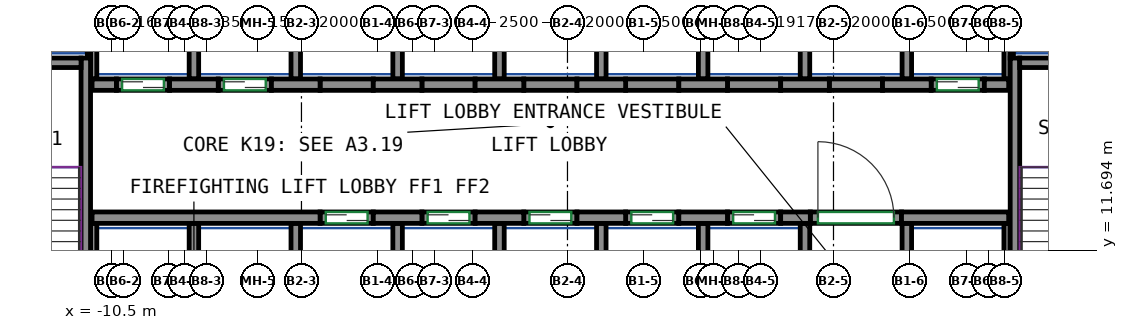
"""IFC4 building model, lengths in metres.
Left out: names, types, materials, properties, quantities, classifications, styles, units other than length and angle.
Written with IfcOpenShell. Run it as: python <this file> out.ifc"""

import sys

from ifc_helpers import new_model, si_unit, direction, frame, frame_2d, origin, place, context, subcontext, project, spatial, rectangle, extrude, source, transform, mapped, element, fill, save


model = new_model("IFC4")
c1 = context("Model", 3, precision=1e-05, world=origin(), true_north=direction((0.0, 1.0)))
c2 = subcontext(c1, "Body", "Model", "MODEL_VIEW")
j1 = project(units=[si_unit("LENGTHUNIT", "METRE"), si_unit("PLANEANGLEUNIT", "RADIAN")], contexts=[c1])
p1 = place(None, origin())
s1 = spatial("IfcSite", under=j1, at=p1, CompositionType="ELEMENT")
p2 = place(p1, origin())
s2 = spatial("IfcBuilding", under=s1, at=p2, CompositionType="ELEMENT")
p3 = place(p2, frame((0.0, 0.0, 79.2)))
s3 = spatial("IfcBuildingStorey", under=s2, at=p3, CompositionType="ELEMENT", Elevation=79.2)
m1 = source(origin(), c2, "Body", "SweptSolid", [
    extrude(rectangle(XDim=7.75, YDim=0.25, at=frame_2d((3.875, 0.0))), origin(), (0.0, 0.0, 1.0), 3.72),
])
p4 = place(p3, frame((-11.175, 9.0, 0.0), z_axis=(0.0, 0.0, 1.0), x_axis=(0.0, 1.0, 0.0)))
e1 = element("IfcWall", 1, at=p4, inside=s3, PredefinedType="SHEAR", context=c2, shape_type="MappedRepresentation", body=[
    mapped(m1, transform((0.0, 0.0, 0.0))),
])
m2 = source(origin(), c2, "Body", "SweptSolid", [
    extrude(rectangle(XDim=3.7, YDim=0.25, at=frame_2d((1.85, 0.0))), origin(), (0.0, 0.0, 1.0), 3.72),
])
p5 = place(p3, frame((-15.0, 16.625, 0.0), z_axis=(0.0, 0.0, 1.0), x_axis=(1.0, 0.0, 0.0)))
e2 = element("IfcWall", 2, at=p5, inside=s3, PredefinedType="SHEAR", context=c2, shape_type="MappedRepresentation", body=[
    mapped(m2, transform((0.0, 0.0, 0.0))),
])
p6 = place(p3, frame((13.275, 9.0, 0.0), z_axis=(0.0, 0.0, 1.0), x_axis=(0.0, 1.0, 0.0)))
e3 = element("IfcWall", 3, at=p6, inside=s3, PredefinedType="SHEAR", context=c2, shape_type="MappedRepresentation", body=[
    mapped(m1, transform((0.0, 0.0, 0.0))),
])
m3 = source(origin(), c2, "Body", "SweptSolid", [
    extrude(rectangle(XDim=3.7, YDim=0.25, at=frame_2d((1.85, 0.0))), origin(), (0.0, 0.0, 1.0), 3.72),
])
p7 = place(p3, frame((13.4, 16.625, 0.0), z_axis=(0.0, 0.0, 1.0), x_axis=(1.0, 0.0, 0.0)))
e4 = element("IfcWall", 4, at=p7, inside=s3, PredefinedType="SHEAR", context=c2, shape_type="MappedRepresentation", body=[
    mapped(m3, transform((0.0, 0.0, 0.0))),
])
m4 = source(origin(), c2, "Body", "SweptSolid", [
    extrude(rectangle(XDim=6.0, YDim=0.3, at=frame_2d((3.0, 0.0))), origin(), (0.0, 0.0, 1.0), 3.72),
])
p8 = place(p3, frame((-11.01, 12.55, 0.0), z_axis=(0.0, 0.0, 1.0), x_axis=(1.0, 0.0, 0.0)))
e5 = element("IfcWall", 5, at=p8, inside=s3, PredefinedType="SHEAR", context=c2, shape_type="MappedRepresentation", body=[
    mapped(m4, transform((0.0, 0.0, 0.0))),
])
m5 = source(origin(), c2, "Body", "SweptSolid", [
    extrude(rectangle(XDim=1.28, YDim=0.3, at=frame_2d((0.64, 0.0))), origin(), (0.0, 0.0, 1.0), 3.72),
])
for number, where, z_axis, x_axis in (
    (6, (-3.61, 12.55, 0.0), (0.0, 0.0, 1.0), (1.0, 0.0, 0.0)),
    (7, (-0.93, 12.55, 0.0), (0.0, 0.0, 1.0), (1.0, 0.0, 0.0)),
    (8, (1.75, 12.55, 0.0), (0.0, 0.0, 1.0), (1.0, 0.0, 0.0)),
    (9, (4.43, 12.55, 0.0), (0.0, 0.0, 1.0), (1.0, 0.0, 0.0)),
):
    element("IfcWall", number, at=place(p3, frame(where, z_axis=z_axis, x_axis=x_axis)), inside=s3, PredefinedType="SHEAR", context=c2, shape_type="MappedRepresentation", body=[
        mapped(m5, transform((0.0, 0.0, 0.0))),
    ])
m6 = source(origin(), c2, "Body", "SweptSolid", [
    extrude(rectangle(XDim=0.78, YDim=0.3, at=frame_2d((0.39, 0.0))), origin(), (0.0, 0.0, 1.0), 3.72),
])
p9 = place(p3, frame((7.11, 12.55, 0.0), z_axis=(0.0, 0.0, 1.0), x_axis=(1.0, 0.0, 0.0)))
e10 = element("IfcWall", 10, at=p9, inside=s3, PredefinedType="SHEAR", context=c2, shape_type="MappedRepresentation", body=[
    mapped(m6, transform((0.0, 0.0, 0.0))),
])
m7 = source(origin(), c2, "Body", "SweptSolid", [
    extrude(rectangle(XDim=2.82, YDim=0.3, at=frame_2d((1.41, 0.0))), origin(), (0.0, 0.0, 1.0), 3.72),
])
p10 = place(p3, frame((10.29, 12.55, 0.0), z_axis=(0.0, 0.0, 1.0), x_axis=(1.0, 0.0, 0.0)))
e11 = element("IfcWall", 11, at=p10, inside=s3, PredefinedType="SHEAR", context=c2, shape_type="MappedRepresentation", body=[
    mapped(m7, transform((0.0, 0.0, 0.0))),
])
m8 = source(origin(), c2, "Body", "SweptSolid", [
    extrude(rectangle(XDim=0.64, YDim=0.3, at=frame_2d((0.32, 0.0))), origin(), (0.0, 0.0, 1.0), 3.72),
])
p11 = place(p3, frame((-11.01, 16.05, 0.0), z_axis=(0.0, 0.0, 1.0), x_axis=(1.0, 0.0, 0.0)))
e12 = element("IfcWall", 12, at=p11, inside=s3, PredefinedType="SHEAR", context=c2, shape_type="MappedRepresentation", body=[
    mapped(m8, transform((0.0, 0.0, 0.0))),
])
for number, where, z_axis, x_axis in (
    (13, (-8.97, 16.05, 0.0), (0.0, 0.0, 1.0), (1.0, 0.0, 0.0)),
    (14, (-6.29, 16.05, 0.0), (0.0, 0.0, 1.0), (1.0, 0.0, 0.0)),
    (15, (-3.61, 16.05, 0.0), (0.0, 0.0, 1.0), (1.0, 0.0, 0.0)),
    (16, (-0.93, 16.05, 0.0), (0.0, 0.0, 1.0), (1.0, 0.0, 0.0)),
    (17, (1.75, 16.05, 0.0), (0.0, 0.0, 1.0), (1.0, 0.0, 0.0)),
    (18, (4.43, 16.05, 0.0), (0.0, 0.0, 1.0), (1.0, 0.0, 0.0)),
):
    element("IfcWall", number, at=place(p3, frame(where, z_axis=z_axis, x_axis=x_axis)), inside=s3, PredefinedType="SHEAR", context=c2, shape_type="MappedRepresentation", body=[
        mapped(m5, transform((0.0, 0.0, 0.0))),
    ])
m9 = source(origin(), c2, "Body", "SweptSolid", [
    extrude(rectangle(XDim=1.28, YDim=0.3, at=frame_2d((0.64, 0.0))), origin(), (0.0, 0.0, 1.0), 3.72),
])
p12 = place(p3, frame((7.11, 16.05, 0.0), z_axis=(0.0, 0.0, 1.0), x_axis=(1.0, 0.0, 0.0)))
e19 = element("IfcWall", 19, at=p12, inside=s3, PredefinedType="SHEAR", context=c2, shape_type="MappedRepresentation", body=[
    mapped(m9, transform((0.0, 0.0, 0.0))),
])
p13 = place(p3, frame((9.79, 16.05, 0.0), z_axis=(0.0, 0.0, 1.0), x_axis=(1.0, 0.0, 0.0)))
e20 = element("IfcWall", 20, at=p13, inside=s3, PredefinedType="SHEAR", context=c2, shape_type="MappedRepresentation", body=[
    mapped(m5, transform((0.0, 0.0, 0.0))),
])
m10 = source(origin(), c2, "Body", "SweptSolid", [
    extrude(rectangle(XDim=0.64, YDim=0.3, at=frame_2d((0.32, 0.0))), origin(), (0.0, 0.0, 1.0), 3.72),
])
p14 = place(p3, frame((12.47, 16.05, 0.0), z_axis=(0.0, 0.0, 1.0), x_axis=(1.0, 0.0, 0.0)))
e21 = element("IfcWall", 21, at=p14, inside=s3, PredefinedType="SHEAR", context=c2, shape_type="MappedRepresentation", body=[
    mapped(m10, transform((0.0, 0.0, 0.0))),
])
m11 = source(origin(), c2, "Body", "SweptSolid", [
    extrude(rectangle(XDim=1.4, YDim=0.3, at=frame_2d((0.7, 0.0))), origin(), (0.0, 0.0, 1.0), 3.72),
])
p15 = place(p3, frame((-5.01, 12.55, 0.0), z_axis=(0.0, 0.0, 1.0), x_axis=(1.0, 0.0, 0.0)))
e22 = element("IfcWall", 22, at=p15, inside=s3, PredefinedType="PARTITIONING", context=c2, shape_type="MappedRepresentation", body=[
    mapped(m11, transform((0.0, 0.0, 0.0))),
])
p16 = place(p15, frame((0.15, 0.0, 0.0)))
e23 = element("IfcOpeningElement", 23, at=p16, cuts=e22, PredefinedType="OPENING", context=c2, shape_type="SweptSolid", body=[
    extrude(rectangle(XDim=1.1, YDim=2.1, at=frame_2d((0.55, 1.05))), frame((0.0, 0.16, 0.0), z_axis=(0.0, -1.0, 0.0), x_axis=(1.0, 0.0, 0.0)), (0.0, 0.0, 1.0), 0.32),
])
m12 = source(origin(), c2, "Body", "SweptSolid", [
    extrude(rectangle(XDim=1.4, YDim=0.3, at=frame_2d((0.7, 0.0))), origin(), (0.0, 0.0, 1.0), 3.72),
])
p17 = place(p3, frame((-2.33, 12.55, 0.0), z_axis=(0.0, 0.0, 1.0), x_axis=(1.0, 0.0, 0.0)))
e24 = element("IfcWall", 24, at=p17, inside=s3, PredefinedType="PARTITIONING", context=c2, shape_type="MappedRepresentation", body=[
    mapped(m12, transform((0.0, 0.0, 0.0))),
])
p18 = place(p17, frame((0.15, 0.0, 0.0)))
e25 = element("IfcOpeningElement", 25, at=p18, cuts=e24, PredefinedType="OPENING", context=c2, shape_type="SweptSolid", body=[
    extrude(rectangle(XDim=1.1, YDim=2.1, at=frame_2d((0.55, 1.05))), frame((0.0, 0.16, 0.0), z_axis=(0.0, -1.0, 0.0), x_axis=(1.0, 0.0, 0.0)), (0.0, 0.0, 1.0), 0.32),
])
p19 = place(p3, frame((0.35, 12.55, 0.0), z_axis=(0.0, 0.0, 1.0), x_axis=(1.0, 0.0, 0.0)))
e26 = element("IfcWall", 26, at=p19, inside=s3, PredefinedType="PARTITIONING", context=c2, shape_type="MappedRepresentation", body=[
    mapped(m11, transform((0.0, 0.0, 0.0))),
])
p20 = place(p19, frame((0.15, 0.0, 0.0)))
e27 = element("IfcOpeningElement", 27, at=p20, cuts=e26, PredefinedType="OPENING", context=c2, shape_type="SweptSolid", body=[
    extrude(rectangle(XDim=1.1, YDim=2.1, at=frame_2d((0.55, 1.05))), frame((0.0, 0.16, 0.0), z_axis=(0.0, -1.0, 0.0), x_axis=(1.0, 0.0, 0.0)), (0.0, 0.0, 1.0), 0.32),
])
p21 = place(p3, frame((3.03, 12.55, 0.0), z_axis=(0.0, 0.0, 1.0), x_axis=(1.0, 0.0, 0.0)))
e28 = element("IfcWall", 28, at=p21, inside=s3, PredefinedType="PARTITIONING", context=c2, shape_type="MappedRepresentation", body=[
    mapped(m11, transform((0.0, 0.0, 0.0))),
])
p22 = place(p21, frame((0.15, 0.0, 0.0)))
e29 = element("IfcOpeningElement", 29, at=p22, cuts=e28, PredefinedType="OPENING", context=c2, shape_type="SweptSolid", body=[
    extrude(rectangle(XDim=1.1, YDim=2.1, at=frame_2d((0.55, 1.05))), frame((0.0, 0.16, 0.0), z_axis=(0.0, -1.0, 0.0), x_axis=(1.0, 0.0, 0.0)), (0.0, 0.0, 1.0), 0.32),
])
p23 = place(p3, frame((5.71, 12.55, 0.0), z_axis=(0.0, 0.0, 1.0), x_axis=(1.0, 0.0, 0.0)))
e30 = element("IfcWall", 30, at=p23, inside=s3, PredefinedType="PARTITIONING", context=c2, shape_type="MappedRepresentation", body=[
    mapped(m12, transform((0.0, 0.0, 0.0))),
])
p24 = place(p23, frame((0.15, 0.0, 0.0)))
e31 = element("IfcOpeningElement", 31, at=p24, cuts=e30, PredefinedType="OPENING", context=c2, shape_type="SweptSolid", body=[
    extrude(rectangle(XDim=1.1, YDim=2.1, at=frame_2d((0.55, 1.05))), frame((0.0, 0.16, 0.0), z_axis=(0.0, -1.0, 0.0), x_axis=(1.0, 0.0, 0.0)), (0.0, 0.0, 1.0), 0.32),
])
p25 = place(p3, frame((11.07, 16.05, 0.0), z_axis=(0.0, 0.0, 1.0), x_axis=(1.0, 0.0, 0.0)))
e32 = element("IfcWall", 32, at=p25, inside=s3, PredefinedType="PARTITIONING", context=c2, shape_type="MappedRepresentation", body=[
    mapped(m11, transform((0.0, 0.0, 0.0))),
])
p26 = place(p25, frame((0.15, 0.0, 0.0)))
e33 = element("IfcOpeningElement", 33, at=p26, cuts=e32, PredefinedType="OPENING", context=c2, shape_type="SweptSolid", body=[
    extrude(rectangle(XDim=1.1, YDim=2.1, at=frame_2d((0.55, 1.05))), frame((0.0, 0.16, 0.0), z_axis=(0.0, -1.0, 0.0), x_axis=(1.0, 0.0, 0.0)), (0.0, 0.0, 1.0), 0.32),
])
p27 = place(p3, frame((-10.37, 16.05, 0.0), z_axis=(0.0, 0.0, 1.0), x_axis=(1.0, 0.0, 0.0)))
e34 = element("IfcWall", 34, at=p27, inside=s3, PredefinedType="PARTITIONING", context=c2, shape_type="MappedRepresentation", body=[
    mapped(m12, transform((0.0, 0.0, 0.0))),
])
p28 = place(p27, frame((0.15, 0.0, 0.0)))
e35 = element("IfcOpeningElement", 35, at=p28, cuts=e34, PredefinedType="OPENING", context=c2, shape_type="SweptSolid", body=[
    extrude(rectangle(XDim=1.1, YDim=2.1, at=frame_2d((0.55, 1.05))), frame((0.0, 0.16, 0.0), z_axis=(0.0, -1.0, 0.0), x_axis=(1.0, 0.0, 0.0)), (0.0, 0.0, 1.0), 0.32),
])
p29 = place(p3, frame((-7.69, 16.05, 0.0), z_axis=(0.0, 0.0, 1.0), x_axis=(1.0, 0.0, 0.0)))
e36 = element("IfcWall", 36, at=p29, inside=s3, PredefinedType="PARTITIONING", context=c2, shape_type="MappedRepresentation", body=[
    mapped(m11, transform((0.0, 0.0, 0.0))),
])
p30 = place(p29, frame((0.15, 0.0, 0.0)))
e37 = element("IfcOpeningElement", 37, at=p30, cuts=e36, PredefinedType="OPENING", context=c2, shape_type="SweptSolid", body=[
    extrude(rectangle(XDim=1.1, YDim=2.1, at=frame_2d((0.55, 1.05))), frame((0.0, 0.16, 0.0), z_axis=(0.0, -1.0, 0.0), x_axis=(1.0, 0.0, 0.0)), (0.0, 0.0, 1.0), 0.32),
])
m13 = source(origin(), c2, "Body", "SweptSolid", [
    extrude(rectangle(XDim=2.4, YDim=0.3, at=frame_2d((1.2, 0.0))), origin(), (0.0, 0.0, 1.0), 3.72),
])
p31 = place(p3, frame((7.89, 12.55, 0.0), z_axis=(0.0, 0.0, 1.0), x_axis=(1.0, 0.0, 0.0)))
e38 = element("IfcWall", 38, at=p31, inside=s3, PredefinedType="PARTITIONING", context=c2, shape_type="MappedRepresentation", body=[
    mapped(m13, transform((0.0, 0.0, 0.0))),
])
p32 = place(p31, frame((0.2, 0.0, 0.0)))
e39 = element("IfcOpeningElement", 39, at=p32, cuts=e38, PredefinedType="OPENING", context=c2, shape_type="SweptSolid", body=[
    extrude(rectangle(XDim=2.0, YDim=2.1, at=frame_2d((1.0, 1.05))), frame((0.0, 0.16, 0.0), z_axis=(0.0, -1.0, 0.0), x_axis=(1.0, 0.0, 0.0)), (0.0, 0.0, 1.0), 0.32),
])
p33 = place(p3, frame((-5.01, 16.05, 0.0), z_axis=(0.0, 0.0, 1.0), x_axis=(1.0, 0.0, 0.0)))
e40 = element("IfcWall", 40, at=p33, inside=s3, PredefinedType="PARTITIONING", context=c2, shape_type="MappedRepresentation", body=[
    mapped(m11, transform((0.0, 0.0, 0.0))),
])
p34 = place(p3, frame((-2.33, 16.05, 0.0), z_axis=(0.0, 0.0, 1.0), x_axis=(1.0, 0.0, 0.0)))
e41 = element("IfcWall", 41, at=p34, inside=s3, PredefinedType="PARTITIONING", context=c2, shape_type="MappedRepresentation", body=[
    mapped(m12, transform((0.0, 0.0, 0.0))),
])
for number, where, z_axis, x_axis in (
    (42, (0.35, 16.05, 0.0), (0.0, 0.0, 1.0), (1.0, 0.0, 0.0)),
    (43, (3.03, 16.05, 0.0), (0.0, 0.0, 1.0), (1.0, 0.0, 0.0)),
):
    element("IfcWall", number, at=place(p3, frame(where, z_axis=z_axis, x_axis=x_axis)), inside=s3, PredefinedType="PARTITIONING", context=c2, shape_type="MappedRepresentation", body=[
        mapped(m11, transform((0.0, 0.0, 0.0))),
    ])
for number, where, z_axis, x_axis in (
    (44, (5.71, 16.05, 0.0), (0.0, 0.0, 1.0), (1.0, 0.0, 0.0)),
    (45, (8.39, 16.05, 0.0), (0.0, 0.0, 1.0), (1.0, 0.0, 0.0)),
):
    element("IfcWall", number, at=place(p3, frame(where, z_axis=z_axis, x_axis=x_axis)), inside=s3, PredefinedType="PARTITIONING", context=c2, shape_type="MappedRepresentation", body=[
        mapped(m12, transform((0.0, 0.0, 0.0))),
    ])
m14 = source(origin(), c2, "Body", "SweptSolid", [
    extrude(rectangle(XDim=3.275, YDim=0.165, at=frame_2d((1.638, 0.0))), origin(), (0.0, 0.0, 1.0), 3.72),
])
for number, where, z_axis, x_axis in (
    (46, (13.067, 16.2, 0.0), (0.0, 0.0, 1.0), (0.0, 1.0, 0.0)),
    (47, (-10.968, 16.2, 0.0), (0.0, 0.0, 1.0), (0.0, 1.0, 0.0)),
):
    element("IfcWall", number, at=place(p3, frame(where, z_axis=z_axis, x_axis=x_axis)), inside=s3, PredefinedType="PARTITIONING", context=c2, shape_type="MappedRepresentation", body=[
        mapped(m14, transform((0.0, 0.0, 0.0))),
    ])
m15 = source(origin(), c2, "Body", "SweptSolid", [
    extrude(rectangle(XDim=3.275, YDim=0.25, at=frame_2d((1.638, 0.0))), origin(), (0.0, 0.0, 1.0), 3.72),
])
p35 = place(p3, frame((10.43, 16.2, 0.0), z_axis=(0.0, 0.0, 1.0), x_axis=(0.0, 1.0, 0.0)))
e48 = element("IfcWall", 48, at=p35, inside=s3, PredefinedType="PARTITIONING", context=c2, shape_type="MappedRepresentation", body=[
    mapped(m15, transform((0.0, 0.0, 0.0))),
])
m16 = source(origin(), c2, "Body", "SweptSolid", [
    extrude(rectangle(XDim=2.725, YDim=0.085, at=frame_2d((1.363, 0.0))), origin(), (0.0, 0.0, 1.0), 3.72),
])
p36 = place(p3, frame((13.192, 16.75, 0.0), z_axis=(0.0, 0.0, 1.0), x_axis=(0.0, 1.0, 0.0)))
e49 = element("IfcWall", 49, at=p36, inside=s3, PredefinedType="PARTITIONING", context=c2, shape_type="MappedRepresentation", body=[
    mapped(m16, transform((0.0, 0.0, 0.0))),
])
for number, where, z_axis, x_axis in (
    (50, (2.39, 16.2, 0.0), (0.0, 0.0, 1.0), (0.0, 1.0, 0.0)),
    (51, (5.07, 16.2, 0.0), (0.0, 0.0, 1.0), (0.0, 1.0, 0.0)),
    (52, (7.75, 16.2, 0.0), (0.0, 0.0, 1.0), (0.0, 1.0, 0.0)),
    (53, (-0.29, 16.2, 0.0), (0.0, 0.0, 1.0), (0.0, 1.0, 0.0)),
):
    element("IfcWall", number, at=place(p3, frame(where, z_axis=z_axis, x_axis=x_axis)), inside=s3, PredefinedType="PARTITIONING", context=c2, shape_type="MappedRepresentation", body=[
        mapped(m15, transform((0.0, 0.0, 0.0))),
    ])
p37 = place(p3, frame((-11.093, 16.75, 0.0), z_axis=(0.0, 0.0, 1.0), x_axis=(0.0, 1.0, 0.0)))
e54 = element("IfcWall", 54, at=p37, inside=s3, PredefinedType="PARTITIONING", context=c2, shape_type="MappedRepresentation", body=[
    mapped(m16, transform((0.0, 0.0, 0.0))),
])
for number, where, z_axis, x_axis in (
    (55, (-2.97, 16.2, 0.0), (0.0, 0.0, 1.0), (0.0, 1.0, 0.0)),
    (56, (-5.65, 16.2, 0.0), (0.0, 0.0, 1.0), (0.0, 1.0, 0.0)),
    (57, (-8.33, 16.2, 0.0), (0.0, 0.0, 1.0), (0.0, 1.0, 0.0)),
):
    element("IfcWall", number, at=place(p3, frame(where, z_axis=z_axis, x_axis=x_axis)), inside=s3, PredefinedType="PARTITIONING", context=c2, shape_type="MappedRepresentation", body=[
        mapped(m15, transform((0.0, 0.0, 0.0))),
    ])
m17 = source(origin(), c2, "Body", "SweptSolid", [
    extrude(rectangle(XDim=3.4, YDim=0.25, at=frame_2d((1.7, 0.0))), origin(), (0.0, 0.0, 1.0), 3.72),
])
p38 = place(p3, frame((10.43, 9.0, 0.0), z_axis=(0.0, 0.0, 1.0), x_axis=(0.0, 1.0, 0.0)))
e58 = element("IfcWall", 58, at=p38, inside=s3, PredefinedType="PARTITIONING", context=c2, shape_type="MappedRepresentation", body=[
    mapped(m17, transform((0.0, 0.0, 0.0))),
])
m18 = source(origin(), c2, "Body", "SweptSolid", [
    extrude(rectangle(XDim=3.4, YDim=0.165, at=frame_2d((1.7, 0.0))), origin(), (0.0, 0.0, 1.0), 3.72),
])
p39 = place(p3, frame((13.067, 9.0, 0.0), z_axis=(0.0, 0.0, 1.0), x_axis=(0.0, 1.0, 0.0)))
e59 = element("IfcWall", 59, at=p39, inside=s3, PredefinedType="PARTITIONING", context=c2, shape_type="MappedRepresentation", body=[
    mapped(m18, transform((0.0, 0.0, 0.0))),
])
for number, where, z_axis, x_axis in (
    (60, (2.39, 9.0, 0.0), (0.0, 0.0, 1.0), (0.0, 1.0, 0.0)),
    (61, (5.07, 9.0, 0.0), (0.0, 0.0, 1.0), (0.0, 1.0, 0.0)),
    (62, (7.75, 9.0, 0.0), (0.0, 0.0, 1.0), (0.0, 1.0, 0.0)),
    (63, (-0.29, 9.0, 0.0), (0.0, 0.0, 1.0), (0.0, 1.0, 0.0)),
):
    element("IfcWall", number, at=place(p3, frame(where, z_axis=z_axis, x_axis=x_axis)), inside=s3, PredefinedType="PARTITIONING", context=c2, shape_type="MappedRepresentation", body=[
        mapped(m17, transform((0.0, 0.0, 0.0))),
    ])
p40 = place(p3, frame((-10.968, 9.0, 0.0), z_axis=(0.0, 0.0, 1.0), x_axis=(0.0, 1.0, 0.0)))
e64 = element("IfcWall", 64, at=p40, inside=s3, PredefinedType="PARTITIONING", context=c2, shape_type="MappedRepresentation", body=[
    mapped(m18, transform((0.0, 0.0, 0.0))),
])
for number, where, z_axis, x_axis in (
    (65, (-2.97, 9.0, 0.0), (0.0, 0.0, 1.0), (0.0, 1.0, 0.0)),
    (66, (-5.65, 9.0, 0.0), (0.0, 0.0, 1.0), (0.0, 1.0, 0.0)),
    (67, (-8.33, 9.0, 0.0), (0.0, 0.0, 1.0), (0.0, 1.0, 0.0)),
):
    element("IfcWall", number, at=place(p3, frame(where, z_axis=z_axis, x_axis=x_axis)), inside=s3, PredefinedType="PARTITIONING", context=c2, shape_type="MappedRepresentation", body=[
        mapped(m17, transform((0.0, 0.0, 0.0))),
    ])
p41 = place(p32, origin())
e68 = element("IfcDoor", 68, at=p41, inside=s3, OperationType="DOUBLE_DOOR_SINGLE_SWING", PredefinedType="DOOR", context=c2, shape_type="SweptSolid", body=[
    extrude(rectangle(XDim=2.0, YDim=2.1, at=frame_2d((1.0, 1.05))), frame((0.0, 0.025, 0.0), z_axis=(0.0, -1.0, 0.0), x_axis=(1.0, 0.0, 0.0)), (0.0, 0.0, 1.0), 0.05),
])
fill(e39, e68)
p42 = place(p16, origin())
e69 = element("IfcDoor", 69, at=p42, inside=s3, OperationType="DOUBLE_DOOR_SLIDING", PredefinedType="DOOR", context=c2, shape_type="SweptSolid", body=[
    extrude(rectangle(XDim=1.1, YDim=2.1, at=frame_2d((0.55, 1.05))), frame((0.0, 0.025, 0.0), z_axis=(0.0, -1.0, 0.0), x_axis=(1.0, 0.0, 0.0)), (0.0, 0.0, 1.0), 0.05),
])
fill(e23, e69)
p43 = place(p18, origin())
e70 = element("IfcDoor", 70, at=p43, inside=s3, OperationType="DOUBLE_DOOR_SLIDING", PredefinedType="DOOR", context=c2, shape_type="SweptSolid", body=[
    extrude(rectangle(XDim=1.1, YDim=2.1, at=frame_2d((0.55, 1.05))), frame((0.0, 0.025, 0.0), z_axis=(0.0, -1.0, 0.0), x_axis=(1.0, 0.0, 0.0)), (0.0, 0.0, 1.0), 0.05),
])
fill(e25, e70)
p44 = place(p20, origin())
e71 = element("IfcDoor", 71, at=p44, inside=s3, OperationType="DOUBLE_DOOR_SLIDING", PredefinedType="DOOR", context=c2, shape_type="SweptSolid", body=[
    extrude(rectangle(XDim=1.1, YDim=2.1, at=frame_2d((0.55, 1.05))), frame((0.0, 0.025, 0.0), z_axis=(0.0, -1.0, 0.0), x_axis=(1.0, 0.0, 0.0)), (0.0, 0.0, 1.0), 0.05),
])
fill(e27, e71)
p45 = place(p22, origin())
e72 = element("IfcDoor", 72, at=p45, inside=s3, OperationType="DOUBLE_DOOR_SLIDING", PredefinedType="DOOR", context=c2, shape_type="SweptSolid", body=[
    extrude(rectangle(XDim=1.1, YDim=2.1, at=frame_2d((0.55, 1.05))), frame((0.0, 0.025, 0.0), z_axis=(0.0, -1.0, 0.0), x_axis=(1.0, 0.0, 0.0)), (0.0, 0.0, 1.0), 0.05),
])
fill(e29, e72)
p46 = place(p24, origin())
e73 = element("IfcDoor", 73, at=p46, inside=s3, OperationType="DOUBLE_DOOR_SLIDING", PredefinedType="DOOR", context=c2, shape_type="SweptSolid", body=[
    extrude(rectangle(XDim=1.1, YDim=2.1, at=frame_2d((0.55, 1.05))), frame((0.0, 0.025, 0.0), z_axis=(0.0, -1.0, 0.0), x_axis=(1.0, 0.0, 0.0)), (0.0, 0.0, 1.0), 0.05),
])
fill(e31, e73)
p47 = place(p26, origin())
e74 = element("IfcDoor", 74, at=p47, inside=s3, OperationType="DOUBLE_DOOR_SLIDING", PredefinedType="DOOR", context=c2, shape_type="SweptSolid", body=[
    extrude(rectangle(XDim=1.1, YDim=2.1, at=frame_2d((0.55, 1.05))), frame((0.0, 0.025, 0.0), z_axis=(0.0, -1.0, 0.0), x_axis=(1.0, 0.0, 0.0)), (0.0, 0.0, 1.0), 0.05),
])
fill(e33, e74)
p48 = place(p28, origin())
e75 = element("IfcDoor", 75, at=p48, inside=s3, OperationType="DOUBLE_DOOR_SLIDING", PredefinedType="DOOR", context=c2, shape_type="SweptSolid", body=[
    extrude(rectangle(XDim=1.1, YDim=2.1, at=frame_2d((0.55, 1.05))), frame((0.0, 0.025, 0.0), z_axis=(0.0, -1.0, 0.0), x_axis=(1.0, 0.0, 0.0)), (0.0, 0.0, 1.0), 0.05),
])
fill(e35, e75)
p49 = place(p30, origin())
e76 = element("IfcDoor", 76, at=p49, inside=s3, OperationType="DOUBLE_DOOR_SLIDING", PredefinedType="DOOR", context=c2, shape_type="SweptSolid", body=[
    extrude(rectangle(XDim=1.1, YDim=2.1, at=frame_2d((0.55, 1.05))), frame((0.0, 0.025, 0.0), z_axis=(0.0, -1.0, 0.0), x_axis=(1.0, 0.0, 0.0)), (0.0, 0.0, 1.0), 0.05),
])
fill(e37, e76)
save(model, sys.argv[1])
